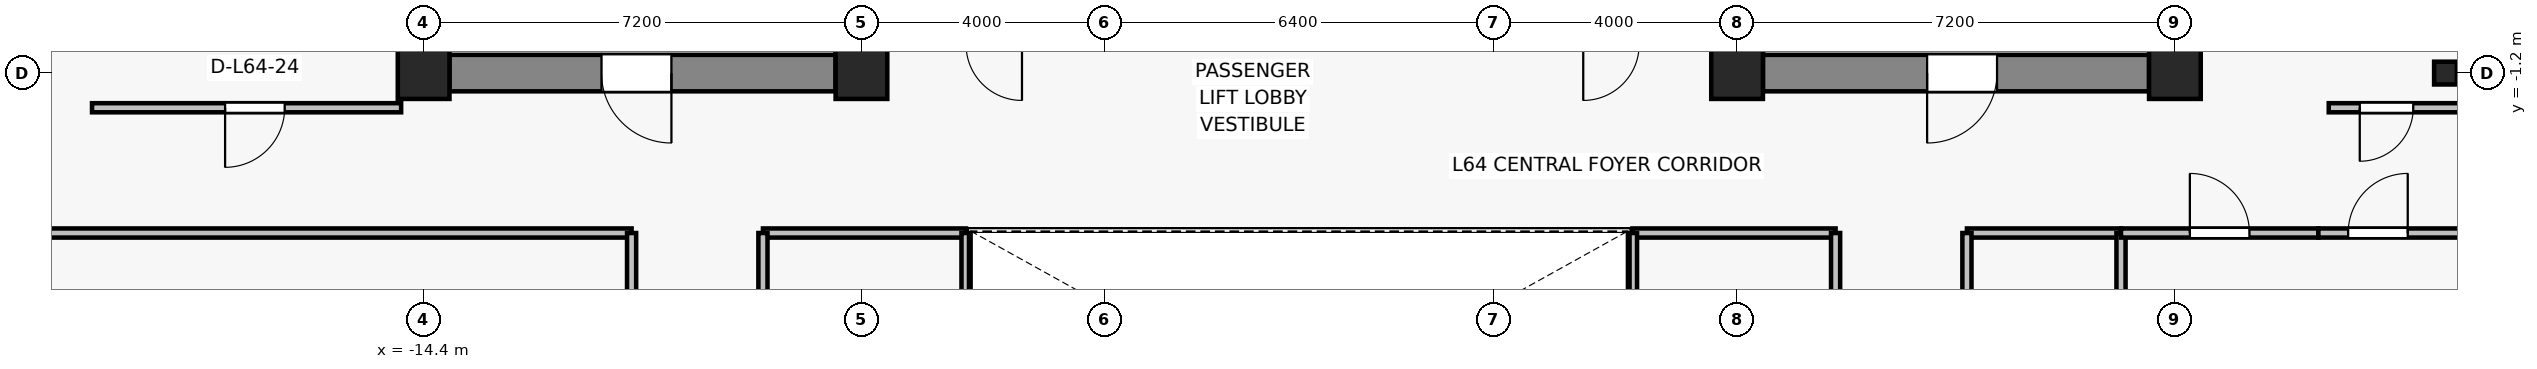
"""IFC4 building model, lengths in metres.
Left out: names, types, materials, properties, quantities, classifications, styles, units other than length and angle.
Written with IfcOpenShell. Run it as: python <this file> out.ifc"""

import sys

from ifc_helpers import new_model, si_unit, direction, frame, frame_2d, origin, origin_2d, place, context, subcontext, project, spatial, rectangle, i_section, extrude, source, transform, mapped, element, fill, save


model = new_model("IFC4")
c1 = context("Model", 3, precision=1e-05, world=origin(), true_north=direction((0.0, 1.0)))
c2 = subcontext(c1, "Body", "Model", "MODEL_VIEW")
j1 = project(units=[si_unit("LENGTHUNIT", "METRE"), si_unit("PLANEANGLEUNIT", "RADIAN")], contexts=[c1])
p1 = place(None, origin())
s1 = spatial("IfcSite", under=j1, at=p1, CompositionType="ELEMENT")
p2 = place(p1, origin())
s2 = spatial("IfcBuilding", under=s1, at=p2, CompositionType="ELEMENT")
p3 = place(p2, frame((0.0, 0.0, 228.7)))
s3 = spatial("IfcBuildingStorey", under=s2, at=p3, CompositionType="ELEMENT", Elevation=228.7)
for number, where, z_axis, x_axis in (
    (1, (-14.4, -1.2, 0.0), (0.0, 0.0, 1.0), (1.0, 0.0, 0.0)),
    (2, (-7.2, -1.2, 0.0), (0.0, 0.0, 1.0), (1.0, 0.0, 0.0)),
    (3, (7.2, -1.2, 0.0), (0.0, 0.0, 1.0), (1.0, 0.0, 0.0)),
    (4, (14.4, -1.2, 0.0), (0.0, 0.0, 1.0), (1.0, 0.0, 0.0)),
):
    element("IfcColumn", number, at=place(p3, frame(where, z_axis=z_axis, x_axis=x_axis)), inside=s3, PredefinedType="COLUMN", context=c2, shape_type="SweptSolid", body=[
        extrude(rectangle(XDim=0.85, YDim=0.85, at=origin_2d()), origin(), (0.0, 0.0, 1.0), 3.3),
    ])
p4 = place(p3, frame((18.85, -1.2, 0.0), z_axis=(0.0, 0.0, 1.0), x_axis=(1.0, 0.0, 0.0)))
e5 = element("IfcColumn", 5, at=p4, inside=s3, PredefinedType="COLUMN", context=c2, shape_type="SweptSolid", body=[
    extrude(i_section(OverallWidth=0.375, OverallDepth=0.375, WebThickness=0.017, FlangeThickness=0.027, FilletRadius=0.015, at=origin_2d()), origin(), (0.0, 0.0, 1.0), 3.3),
])
p5 = place(p3, frame((-7.625, -1.2, 0.0), z_axis=(0.0, 0.0, 1.0), x_axis=(-1.0, 0.0, 0.0)))
e6 = element("IfcWall", 6, at=p5, inside=s3, PredefinedType="SHEAR", context=c2, shape_type="SweptSolid", body=[
    extrude(rectangle(XDim=6.35, YDim=0.6, at=frame_2d((3.175, 0.0))), origin(), (0.0, 0.0, 1.0), 3.075),
])
p6 = place(p5, frame((2.7, 0.0, 0.0)))
e7 = element("IfcOpeningElement", 7, at=p6, cuts=e6, PredefinedType="OPENING", context=c2, shape_type="SweptSolid", body=[
    extrude(rectangle(XDim=1.15, YDim=2.15, at=frame_2d((0.575, 1.075))), frame((0.0, 0.31, 0.0), z_axis=(0.0, -1.0, 0.0), x_axis=(1.0, 0.0, 0.0)), (0.0, 0.0, 1.0), 0.62),
])
p7 = place(p3, frame((13.975, -1.2, 0.0), z_axis=(0.0, 0.0, 1.0), x_axis=(-1.0, 0.0, 0.0)))
e8 = element("IfcWall", 8, at=p7, inside=s3, PredefinedType="SHEAR", context=c2, shape_type="SweptSolid", body=[
    extrude(rectangle(XDim=6.35, YDim=0.6, at=frame_2d((3.175, 0.0))), origin(), (0.0, 0.0, 1.0), 3.075),
])
p8 = place(p7, frame((2.5, 0.0, 0.0)))
e9 = element("IfcOpeningElement", 9, at=p8, cuts=e8, PredefinedType="OPENING", context=c2, shape_type="SweptSolid", body=[
    extrude(rectangle(XDim=1.15, YDim=2.15, at=frame_2d((0.575, 1.075))), frame((0.0, 0.31, 0.0), z_axis=(0.0, -1.0, 0.0), x_axis=(1.0, 0.0, 0.0)), (0.0, 0.0, 1.0), 0.62),
])
for number, where, z_axis, x_axis in (
    (10, (-7.4, -0.9, 0.0), (0.0, 0.0, 1.0), (0.0, 1.0, 0.0)),
    (11, (7.4, -0.9, 0.0), (0.0, 0.0, 1.0), (0.0, 1.0, 0.0)),
):
    element("IfcWall", number, at=place(p3, frame(where, z_axis=z_axis, x_axis=x_axis)), inside=s3, PredefinedType="SHEAR", context=c2, shape_type="SweptSolid", body=[
        extrude(rectangle(XDim=4.15, YDim=0.45, at=frame_2d((2.075, 0.0))), origin(), (0.0, 0.0, 1.0), 3.075),
    ])
p9 = place(p3, frame((-23.53, -3.83, 0.0), z_axis=(0.0, 0.0, 1.0), x_axis=(1.0, 0.0, 0.0)))
e12 = element("IfcWall", 12, at=p9, inside=s3, PredefinedType="PARTITIONING", context=c2, shape_type="SweptSolid", body=[
    extrude(rectangle(XDim=12.55, YDim=0.15, at=frame_2d((6.275, 0.0))), origin(), (0.0, 0.0, 1.0), 2.615),
])
p10 = place(p3, frame((-10.98, -3.83, 0.0), z_axis=(0.0, 0.0, 1.0), x_axis=(0.0, -1.0, 0.0)))
e13 = element("IfcWall", 13, at=p10, inside=s3, PredefinedType="PARTITIONING", context=c2, shape_type="SweptSolid", body=[
    extrude(rectangle(XDim=13.2, YDim=0.15, at=frame_2d((6.6, 0.0))), origin(), (0.0, 0.0, 1.0), 2.615),
])
p11 = place(p10, frame((2.88, 0.0, 0.0)))
e14 = element("IfcOpeningElement", 14, at=p11, cuts=e13, PredefinedType="OPENING", context=c2, shape_type="SweptSolid", body=[
    extrude(rectangle(XDim=0.98, YDim=2.15, at=frame_2d((0.49, 1.075))), frame((0.0, 0.085, 0.0), z_axis=(0.0, -1.0, 0.0), x_axis=(1.0, 0.0, 0.0)), (0.0, 0.0, 1.0), 0.17),
])
p12 = place(p3, frame((10.98, -3.83, 0.0), z_axis=(0.0, 0.0, 1.0), x_axis=(1.0, 0.0, 0.0)))
e15 = element("IfcWall", 15, at=p12, inside=s3, PredefinedType="PARTITIONING", context=c2, shape_type="SweptSolid", body=[
    extrude(rectangle(XDim=2.533, YDim=0.15, at=frame_2d((1.267, 0.0))), origin(), (0.0, 0.0, 1.0), 3.075),
])
p13 = place(p3, frame((10.98, -17.03, 0.0), z_axis=(0.0, 0.0, 1.0), x_axis=(0.0, 1.0, 0.0)))
e16 = element("IfcWall", 16, at=p13, inside=s3, PredefinedType="PARTITIONING", context=c2, shape_type="SweptSolid", body=[
    extrude(rectangle(XDim=13.2, YDim=0.15, at=frame_2d((6.6, 0.0))), origin(), (0.0, 0.0, 1.0), 2.615),
])
p14 = place(p13, frame((9.34, 0.0, 0.0)))
e17 = element("IfcOpeningElement", 17, at=p14, cuts=e16, PredefinedType="OPENING", context=c2, shape_type="SweptSolid", body=[
    extrude(rectangle(XDim=0.98, YDim=2.15, at=frame_2d((0.49, 1.075))), frame((0.0, 0.085, 0.0), z_axis=(0.0, -1.0, 0.0), x_axis=(1.0, 0.0, 0.0)), (0.0, 0.0, 1.0), 0.17),
])
p15 = place(p3, frame((13.513, -3.83, 0.0), z_axis=(0.0, 0.0, 1.0), x_axis=(0.0, -1.0, 0.0)))
e18 = element("IfcWall", 18, at=p15, inside=s3, PredefinedType="PARTITIONING", context=c2, shape_type="SweptSolid", body=[
    extrude(rectangle(XDim=13.2, YDim=0.15, at=frame_2d((6.6, 0.0))), origin(), (0.0, 0.0, 1.0), 2.615),
])
p16 = place(p3, frame((13.513, -3.83, 0.0), z_axis=(0.0, 0.0, 1.0), x_axis=(1.0, 0.0, 0.0)))
e19 = element("IfcWall", 19, at=p16, inside=s3, PredefinedType="PARTITIONING", context=c2, shape_type="SweptSolid", body=[
    extrude(rectangle(XDim=3.246, YDim=0.15, at=frame_2d((1.623, 0.0))), origin(), (0.0, 0.0, 1.0), 2.615),
])
p17 = place(p16, frame((1.133, 0.0, 0.0)))
e20 = element("IfcOpeningElement", 20, at=p17, cuts=e19, PredefinedType="OPENING", context=c2, shape_type="SweptSolid", body=[
    extrude(rectangle(XDim=0.98, YDim=2.15, at=frame_2d((0.49, 1.075))), frame((0.0, 0.085, 0.0), z_axis=(0.0, -1.0, 0.0), x_axis=(1.0, 0.0, 0.0)), (0.0, 0.0, 1.0), 0.17),
])
p18 = place(p3, frame((16.759, -3.83, 0.0), z_axis=(0.0, 0.0, 1.0), x_axis=(1.0, 0.0, 0.0)))
e21 = element("IfcWall", 21, at=p18, inside=s3, PredefinedType="PARTITIONING", context=c2, shape_type="SweptSolid", body=[
    extrude(rectangle(XDim=2.771, YDim=0.15, at=frame_2d((1.385, 0.0))), origin(), (0.0, 0.0, 1.0), 3.075),
])
p19 = place(p18, frame((0.49, 0.0, 0.0)))
e22 = element("IfcOpeningElement", 22, at=p19, cuts=e21, PredefinedType="OPENING", context=c2, shape_type="SweptSolid", body=[
    extrude(rectangle(XDim=0.98, YDim=2.15, at=frame_2d((0.49, 1.075))), frame((0.0, 0.085, 0.0), z_axis=(0.0, -1.0, 0.0), x_axis=(1.0, 0.0, 0.0)), (0.0, 0.0, 1.0), 0.17),
])
p20 = place(p3, frame((-8.82, -3.83, 0.0), z_axis=(0.0, 0.0, 1.0), x_axis=(1.0, 0.0, 0.0)))
e23 = element("IfcWall", 23, at=p20, inside=s3, PredefinedType="PARTITIONING", context=c2, shape_type="SweptSolid", body=[
    extrude(rectangle(XDim=3.34, YDim=0.15, at=frame_2d((1.67, 0.0))), origin(), (0.0, 0.0, 1.0), 2.615),
])
p21 = place(p3, frame((-8.82, -17.03, 0.0), z_axis=(0.0, 0.0, 1.0), x_axis=(0.0, 1.0, 0.0)))
e24 = element("IfcWall", 24, at=p21, inside=s3, PredefinedType="PARTITIONING", context=c2, shape_type="SweptSolid", body=[
    extrude(rectangle(XDim=13.2, YDim=0.15, at=frame_2d((6.6, 0.0))), origin(), (0.0, 0.0, 1.0), 2.615),
])
p22 = place(p21, frame((9.385, 0.0, 0.0)))
e25 = element("IfcOpeningElement", 25, at=p22, cuts=e24, PredefinedType="OPENING", context=c2, shape_type="SweptSolid", body=[
    extrude(rectangle(XDim=0.98, YDim=2.15, at=frame_2d((0.49, 1.075))), frame((0.0, 0.085, 0.0), z_axis=(0.0, -1.0, 0.0), x_axis=(1.0, 0.0, 0.0)), (0.0, 0.0, 1.0), 0.17),
])
p23 = place(p3, frame((-5.48, -3.83, 0.0), z_axis=(0.0, 0.0, 1.0), x_axis=(0.0, -1.0, 0.0)))
e26 = element("IfcWall", 26, at=p23, inside=s3, PredefinedType="PARTITIONING", context=c2, shape_type="SweptSolid", body=[
    extrude(rectangle(XDim=13.2, YDim=0.15, at=frame_2d((6.6, 0.0))), origin(), (0.0, 0.0, 1.0), 2.615),
])
p24 = place(p23, frame((7.22, 0.0, 0.0)))
e27 = element("IfcOpeningElement", 27, at=p24, cuts=e26, PredefinedType="OPENING", context=c2, shape_type="SweptSolid", body=[
    extrude(rectangle(XDim=0.98, YDim=2.15, at=frame_2d((0.49, 1.075))), frame((0.0, 0.085, 0.0), z_axis=(0.0, -1.0, 0.0), x_axis=(1.0, 0.0, 0.0)), (0.0, 0.0, 1.0), 0.17),
])
p25 = place(p3, frame((5.48, -3.83, 0.0), z_axis=(0.0, 0.0, 1.0), x_axis=(1.0, 0.0, 0.0)))
e28 = element("IfcWall", 28, at=p25, inside=s3, PredefinedType="PARTITIONING", context=c2, shape_type="SweptSolid", body=[
    extrude(rectangle(XDim=3.34, YDim=0.15, at=frame_2d((1.67, 0.0))), origin(), (0.0, 0.0, 1.0), 2.615),
])
p26 = place(p3, frame((5.48, -17.03, 0.0), z_axis=(0.0, 0.0, 1.0), x_axis=(0.0, 1.0, 0.0)))
e29 = element("IfcWall", 29, at=p26, inside=s3, PredefinedType="PARTITIONING", context=c2, shape_type="SweptSolid", body=[
    extrude(rectangle(XDim=13.2, YDim=0.15, at=frame_2d((6.6, 0.0))), origin(), (0.0, 0.0, 1.0), 2.615),
])
p27 = place(p3, frame((8.82, -3.83, 0.0), z_axis=(0.0, 0.0, 1.0), x_axis=(0.0, -1.0, 0.0)))
e30 = element("IfcWall", 30, at=p27, inside=s3, PredefinedType="PARTITIONING", context=c2, shape_type="SweptSolid", body=[
    extrude(rectangle(XDim=13.2, YDim=0.15, at=frame_2d((6.6, 0.0))), origin(), (0.0, 0.0, 1.0), 2.615),
])
p28 = place(p27, frame((2.835, 0.0, 0.0)))
e31 = element("IfcOpeningElement", 31, at=p28, cuts=e30, PredefinedType="OPENING", context=c2, shape_type="SweptSolid", body=[
    extrude(rectangle(XDim=0.98, YDim=2.15, at=frame_2d((0.49, 1.075))), frame((0.0, 0.085, 0.0), z_axis=(0.0, -1.0, 0.0), x_axis=(1.0, 0.0, 0.0)), (0.0, 0.0, 1.0), 0.17),
])
p29 = place(p3, frame((-14.77, -1.77, 0.0), z_axis=(0.0, 0.0, 1.0), x_axis=(-1.0, 0.0, 0.0)))
e32 = element("IfcWall", 32, at=p29, inside=s3, PredefinedType="PARTITIONING", context=c2, shape_type="SweptSolid", body=[
    extrude(rectangle(XDim=5.083, YDim=0.15, at=frame_2d((2.542, 0.0))), origin(), (0.0, 0.0, 1.0), 2.765),
])
p30 = place(p29, frame((1.915, 0.0, 0.0)))
e33 = element("IfcOpeningElement", 33, at=p30, cuts=e32, PredefinedType="OPENING", context=c2, shape_type="SweptSolid", body=[
    extrude(rectangle(XDim=0.98, YDim=2.15, at=frame_2d((0.49, 1.075))), frame((0.0, 0.085, 0.0), z_axis=(0.0, -1.0, 0.0), x_axis=(1.0, 0.0, 0.0)), (0.0, 0.0, 1.0), 0.17),
])
p31 = place(p3, frame((19.53, -1.77, 0.0), z_axis=(0.0, 0.0, 1.0), x_axis=(-1.0, 0.0, 0.0)))
e34 = element("IfcWall", 34, at=p31, inside=s3, PredefinedType="PARTITIONING", context=c2, shape_type="SweptSolid", body=[
    extrude(rectangle(XDim=2.6, YDim=0.15, at=frame_2d((1.3, 0.0))), origin(), (0.0, 0.0, 1.0), 3.075),
])
p32 = place(p31, frame((1.21, 0.0, 0.0)))
e35 = element("IfcOpeningElement", 35, at=p32, cuts=e34, PredefinedType="OPENING", context=c2, shape_type="SweptSolid", body=[
    extrude(rectangle(XDim=0.88, YDim=2.1, at=frame_2d((0.44, 1.05))), frame((0.0, 0.085, 0.0), z_axis=(0.0, -1.0, 0.0), x_axis=(1.0, 0.0, 0.0)), (0.0, 0.0, 1.0), 0.17),
])
m1 = source(origin(), c2, "Body", "SweptSolid", [
    extrude(rectangle(XDim=1.15, YDim=2.15, at=frame_2d((0.575, 1.075))), frame((0.0, 0.025, 0.0), z_axis=(0.0, -1.0, 0.0), x_axis=(1.0, 0.0, 0.0)), (0.0, 0.0, 1.0), 0.05),
])
p33 = place(p6, origin())
e36 = element("IfcDoor", 36, at=p33, inside=s3, OperationType="SINGLE_SWING_LEFT", PredefinedType="DOOR", context=c2, shape_type="MappedRepresentation", body=[
    mapped(m1, transform((0.0, 0.0, 0.0), x_axis=(1.0, 0.0, 0.0), y_axis=(0.0, 1.0, 0.0), z_axis=(0.0, 0.0, 1.0), scale=1.0)),
])
fill(e7, e36)
p34 = place(p8, origin())
e37 = element("IfcDoor", 37, at=p34, inside=s3, OperationType="SINGLE_SWING_RIGHT", PredefinedType="DOOR", context=c2, shape_type="MappedRepresentation", body=[
    mapped(m1, transform((0.0, 0.0, 0.0), x_axis=(1.0, 0.0, 0.0), y_axis=(0.0, 1.0, 0.0), z_axis=(0.0, 0.0, 1.0), scale=1.0)),
])
fill(e9, e37)
m2 = source(origin(), c2, "Body", "SweptSolid", [
    extrude(rectangle(XDim=0.98, YDim=2.15, at=frame_2d((0.49, 1.075))), frame((0.0, 0.025, 0.0), z_axis=(0.0, -1.0, 0.0), x_axis=(1.0, 0.0, 0.0)), (0.0, 0.0, 1.0), 0.05),
])
p35 = place(p17, origin())
e38 = element("IfcDoor", 38, at=p35, inside=s3, OperationType="SINGLE_SWING_LEFT", PredefinedType="DOOR", context=c2, shape_type="MappedRepresentation", body=[
    mapped(m2, transform((0.0, 0.0, 0.0), x_axis=(1.0, 0.0, 0.0), y_axis=(0.0, 1.0, 0.0), z_axis=(0.0, 0.0, 1.0), scale=1.0)),
])
fill(e20, e38)
p36 = place(p19, origin())
e39 = element("IfcDoor", 39, at=p36, inside=s3, OperationType="SINGLE_SWING_RIGHT", PredefinedType="DOOR", context=c2, shape_type="MappedRepresentation", body=[
    mapped(m2, transform((0.0, 0.0, 0.0), x_axis=(1.0, 0.0, 0.0), y_axis=(0.0, 1.0, 0.0), z_axis=(0.0, 0.0, 1.0), scale=1.0)),
])
fill(e22, e39)
p37 = place(p30, origin())
e40 = element("IfcDoor", 40, at=p37, inside=s3, OperationType="SINGLE_SWING_RIGHT", PredefinedType="DOOR", context=c2, shape_type="MappedRepresentation", body=[
    mapped(m2, transform((0.0, 0.0, 0.0), x_axis=(1.0, 0.0, 0.0), y_axis=(0.0, 1.0, 0.0), z_axis=(0.0, 0.0, 1.0), scale=1.0)),
])
fill(e33, e40)
m3 = source(origin(), c2, "Body", "SweptSolid", [
    extrude(rectangle(XDim=0.88, YDim=2.1, at=frame_2d((0.44, 1.05))), frame((0.0, 0.025, 0.0), z_axis=(0.0, -1.0, 0.0), x_axis=(1.0, 0.0, 0.0)), (0.0, 0.0, 1.0), 0.05),
])
p38 = place(p32, origin())
e41 = element("IfcDoor", 41, at=p38, inside=s3, OperationType="SINGLE_SWING_RIGHT", PredefinedType="DOOR", context=c2, shape_type="MappedRepresentation", body=[
    mapped(m3, transform((0.0, 0.0, 0.0), x_axis=(1.0, 0.0, 0.0), y_axis=(0.0, 1.0, 0.0), z_axis=(0.0, 0.0, 1.0), scale=1.0)),
])
fill(e35, e41)
save(model, sys.argv[1])
